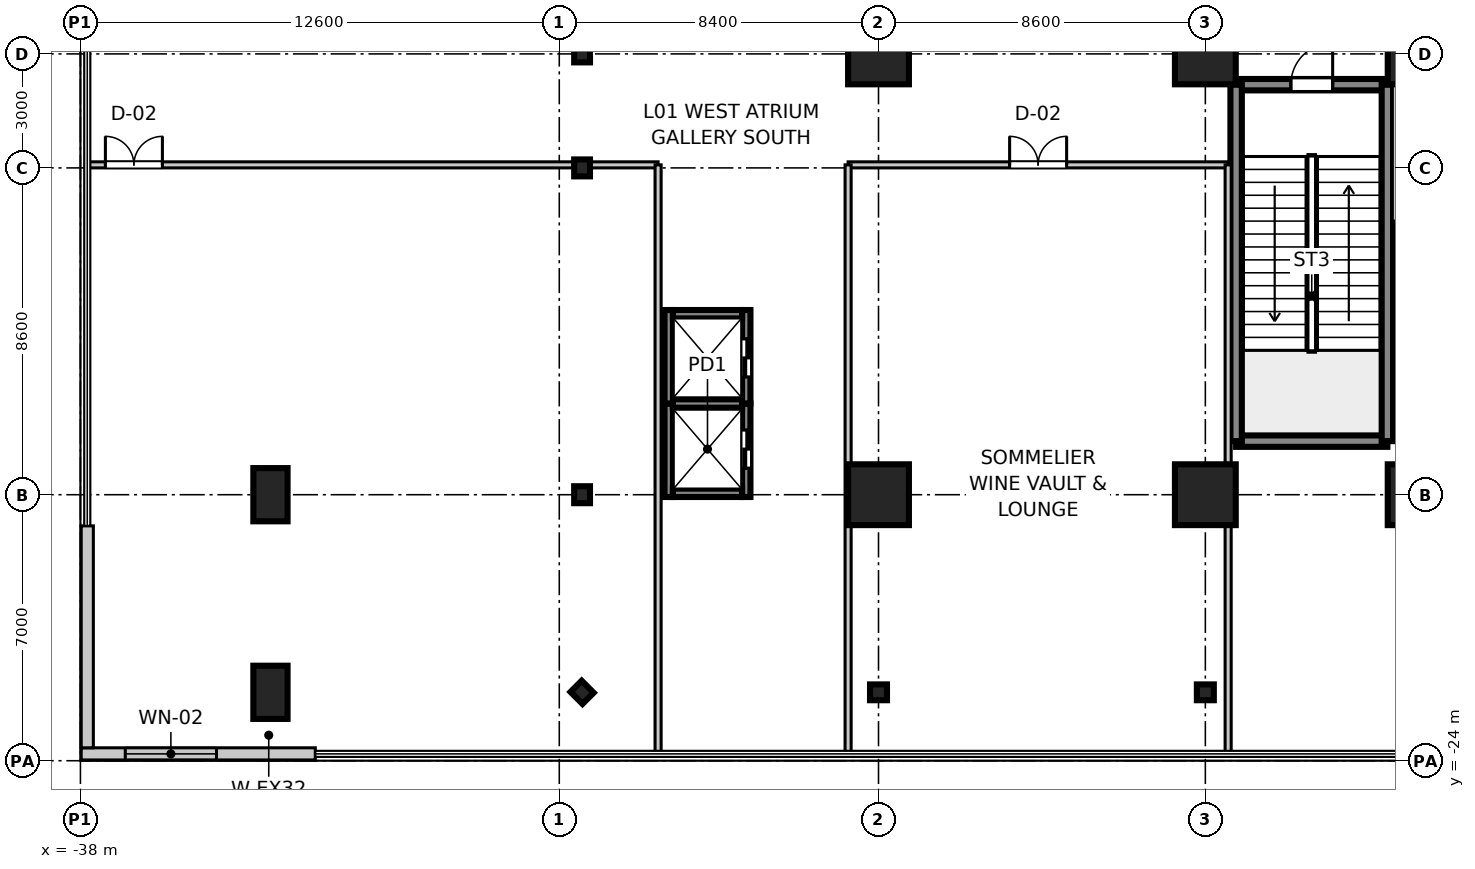
"""IFC4 building model, lengths in metres.
Left out: names, types, materials, properties, quantities, classifications, styles, units other than length and angle.
Written with IfcOpenShell. Run it as: python <this file> out.ifc"""

import sys

from ifc_helpers import new_model, si_unit, direction, frame, frame_2d, origin, origin_2d, place, context, subcontext, project, spatial, rectangle, i_section, extrude, source, transform, mapped, element, fill, save


model = new_model("IFC4")
c1 = context("Model", 3, precision=1e-05, world=origin(), true_north=direction((0.0, 1.0)))
c2 = subcontext(c1, "Body", "Model", "MODEL_VIEW")
j1 = project(units=[si_unit("LENGTHUNIT", "METRE"), si_unit("PLANEANGLEUNIT", "RADIAN")], contexts=[c1])
p1 = place(None, origin())
s1 = spatial("IfcSite", under=j1, at=p1, CompositionType="ELEMENT")
p2 = place(p1, origin())
s2 = spatial("IfcBuilding", under=s1, at=p2, CompositionType="ELEMENT")
p3 = place(p2, frame((0.0, 0.0, 5.4)))
s3 = spatial("IfcBuildingStorey", under=s2, at=p3, CompositionType="ELEMENT", Elevation=5.4)
m1 = source(origin(), c2, "Body", "SweptSolid", [
    extrude(rectangle(XDim=1.6, YDim=1.6, at=origin_2d()), origin(), (0.0, 0.0, 1.0), 5.355),
])
for number, where, z_axis, x_axis in (
    (1, (-17.0, -17.0, 0.0), (0.0, 0.0, 1.0), (1.0, 0.0, 0.0)),
    (2, (-17.0, -5.4, 0.0), (0.0, 0.0, 1.0), (1.0, 0.0, 0.0)),
    (3, (-8.4, -17.0, 0.0), (0.0, 0.0, 1.0), (1.0, 0.0, 0.0)),
    (4, (-8.4, -5.4, 0.0), (0.0, 0.0, 1.0), (1.0, 0.0, 0.0)),
    (5, (-2.8, -17.0, 0.0), (0.0, 0.0, 1.0), (1.0, 0.0, 0.0)),
    (6, (-2.8, -5.4, 0.0), (0.0, 0.0, 1.0), (1.0, 0.0, 0.0)),
):
    element("IfcColumn", number, at=place(p3, frame(where, z_axis=z_axis, x_axis=x_axis)), inside=s3, PredefinedType="COLUMN", context=c2, shape_type="MappedRepresentation", body=[
        mapped(m1, transform((0.0, 0.0, 0.0), scale=1.0)),
    ])
m2 = source(origin(), c2, "Body", "SweptSolid", [
    extrude(rectangle(XDim=0.9, YDim=1.4, at=origin_2d()), origin(), (0.0, 0.0, 1.0), 5.355),
])
for number, where, z_axis, x_axis in (
    (7, (-33.0, -22.2, 0.0), (0.0, 0.0, 1.0), (1.0, 0.0, 0.0)),
    (8, (-33.0, -17.0, 0.0), (0.0, 0.0, 1.0), (1.0, 0.0, 0.0)),
):
    element("IfcColumn", number, at=place(p3, frame(where, z_axis=z_axis, x_axis=x_axis)), inside=s3, PredefinedType="PILASTER", context=c2, shape_type="MappedRepresentation", body=[
        mapped(m2, transform((0.0, 0.0, 0.0), scale=1.0)),
    ])
m3 = source(origin(), c2, "Body", "SweptSolid", [
    extrude(i_section(OverallWidth=0.416, OverallDepth=0.446, WebThickness=0.025, FlangeThickness=0.04, at=origin_2d()), origin(), (0.0, 0.0, 1.0), 5.355),
])
for number, where, z_axis, x_axis in (
    (9, (-24.8, -17.0, 0.0), (0.0, 0.0, 1.0), (1.0, 0.0, 0.0)),
    (10, (-24.8, -8.4, 0.0), (0.0, 0.0, 1.0), (1.0, 0.0, 0.0)),
    (11, (-24.8, -5.4, 0.0), (0.0, 0.0, 1.0), (1.0, 0.0, 0.0)),
    (12, (-17.0, -22.2, 0.0), (0.0, 0.0, 1.0), (0.0, 1.0, 0.0)),
    (13, (-8.4, -22.2, 0.0), (0.0, 0.0, 1.0), (0.0, 1.0, 0.0)),
    (14, (-24.8, -22.2, 0.0), (0.0, 0.0, 1.0), (0.707, 0.707, 0.0)),
):
    element("IfcColumn", number, at=place(p3, frame(where, z_axis=z_axis, x_axis=x_axis)), inside=s3, PredefinedType="COLUMN", context=c2, shape_type="MappedRepresentation", body=[
        mapped(m3, transform((0.0, 0.0, 0.0), scale=1.0)),
    ])
m4 = source(origin(), c2, "Body", "SweptSolid", [
    extrude(rectangle(XDim=3.98, YDim=0.3, at=frame_2d((1.99, 0.0))), origin(), (0.0, 0.0, 1.0), 5.08),
])
p4 = place(p3, frame((-7.59, -15.59, 0.0), z_axis=(0.0, 0.0, 1.0), x_axis=(1.0, 0.0, 0.0)))
e15 = element("IfcWall", 15, at=p4, inside=s3, PredefinedType="SHEAR", context=c2, shape_type="MappedRepresentation", body=[
    mapped(m4, transform((0.0, 0.0, 0.0), scale=1.0)),
])
p5 = place(p3, frame((-7.59, -6.21, 0.0), z_axis=(0.0, 0.0, 1.0), x_axis=(1.0, 0.0, 0.0)))
e16 = element("IfcWall", 16, at=p5, inside=s3, PredefinedType="SHEAR", context=c2, shape_type="MappedRepresentation", body=[
    mapped(m4, transform((0.0, 0.0, 0.0), scale=1.0)),
])
p6 = place(p5, frame((1.44, 0.0, 0.0)))
e17 = element("IfcOpeningElement", 17, at=p6, cuts=e16, PredefinedType="OPENING", context=c2, shape_type="SweptSolid", body=[
    extrude(rectangle(XDim=1.1, YDim=2.15, at=frame_2d((0.55, 1.075))), frame((0.0, 0.16, 0.0), z_axis=(0.0, -1.0, 0.0), x_axis=(1.0, 0.0, 0.0)), (0.0, 0.0, 1.0), 0.32),
])
m5 = source(origin(), c2, "Body", "SweptSolid", [
    extrude(rectangle(XDim=9.38, YDim=0.3, at=frame_2d((4.69, 0.0))), origin(), (0.0, 0.0, 1.0), 5.08),
])
for number, where, z_axis, x_axis in (
    (18, (-7.59, -15.59, 0.0), (0.0, 0.0, 1.0), (0.0, 1.0, 0.0)),
    (19, (-3.61, -15.59, 0.0), (0.0, 0.0, 1.0), (0.0, 1.0, 0.0)),
):
    element("IfcWall", number, at=place(p3, frame(where, z_axis=z_axis, x_axis=x_axis)), inside=s3, PredefinedType="SHEAR", context=c2, shape_type="MappedRepresentation", body=[
        mapped(m5, transform((0.0, 0.0, 0.0), scale=1.0)),
    ])
m6 = source(origin(), c2, "Body", "SweptSolid", [
    extrude(rectangle(XDim=2.46, YDim=0.22, at=frame_2d((1.23, 0.0))), origin(), (0.0, 0.0, 1.0), 5.08),
])
p7 = place(p3, frame((-22.52, -17.06, 0.0), z_axis=(0.0, 0.0, 1.0), x_axis=(0.0, 1.0, 0.0)))
e20 = element("IfcWall", 20, at=p7, inside=s3, PredefinedType="SHEAR", context=c2, shape_type="MappedRepresentation", body=[
    mapped(m6, transform((0.0, 0.0, 0.0), scale=1.0)),
])
p8 = place(p3, frame((-20.48, -17.06, 0.0), z_axis=(0.0, 0.0, 1.0), x_axis=(0.0, 1.0, 0.0)))
e21 = element("IfcWall", 21, at=p8, inside=s3, PredefinedType="SHEAR", context=c2, shape_type="MappedRepresentation", body=[
    mapped(m6, transform((0.0, 0.0, 0.0), scale=1.0)),
])
p9 = place(p8, frame((0.76, 0.0, 0.0)))
e22 = element("IfcOpeningElement", 22, at=p9, cuts=e21, PredefinedType="OPENING", context=c2, shape_type="SweptSolid", body=[
    extrude(rectangle(XDim=1.0, YDim=2.2, at=frame_2d((0.5, 1.1))), frame((0.0, 0.12, 0.0), z_axis=(0.0, -1.0, 0.0), x_axis=(1.0, 0.0, 0.0)), (0.0, 0.0, 1.0), 0.24),
])
m7 = source(origin(), c2, "Body", "SweptSolid", [
    extrude(rectangle(XDim=1.82, YDim=0.22, at=frame_2d((0.91, 0.0))), origin(), (0.0, 0.0, 1.0), 5.08),
])
p10 = place(p3, frame((-22.41, -16.95, 0.0), z_axis=(0.0, 0.0, 1.0), x_axis=(1.0, 0.0, 0.0)))
e23 = element("IfcWall", 23, at=p10, inside=s3, PredefinedType="SHEAR", context=c2, shape_type="MappedRepresentation", body=[
    mapped(m7, transform((0.0, 0.0, 0.0), scale=1.0)),
])
m8 = source(origin(), c2, "Body", "SweptSolid", [
    extrude(rectangle(XDim=1.82, YDim=0.22, at=frame_2d((0.91, 0.0))), origin(), (0.0, 0.0, 1.0), 5.4),
])
p11 = place(p3, frame((-22.41, -14.6, 0.0), z_axis=(0.0, 0.0, 1.0), x_axis=(1.0, 0.0, 0.0)))
e24 = element("IfcWall", 24, at=p11, inside=s3, PredefinedType="SHEAR", context=c2, shape_type="MappedRepresentation", body=[
    mapped(m8, transform((0.0, 0.0, 0.0), scale=1.0)),
])
m9 = source(origin(), c2, "Body", "SweptSolid", [
    extrude(rectangle(XDim=2.46, YDim=0.22, at=frame_2d((1.23, 0.0))), origin(), (0.0, 0.0, 1.0), 5.08),
])
p12 = place(p3, frame((-22.52, -14.6, 0.0), z_axis=(0.0, 0.0, 1.0), x_axis=(0.0, 1.0, 0.0)))
e25 = element("IfcWall", 25, at=p12, inside=s3, PredefinedType="SHEAR", context=c2, shape_type="MappedRepresentation", body=[
    mapped(m9, transform((0.0, 0.0, 0.0), scale=1.0)),
])
p13 = place(p3, frame((-20.48, -14.6, 0.0), z_axis=(0.0, 0.0, 1.0), x_axis=(0.0, 1.0, 0.0)))
e26 = element("IfcWall", 26, at=p13, inside=s3, PredefinedType="SHEAR", context=c2, shape_type="MappedRepresentation", body=[
    mapped(m9, transform((0.0, 0.0, 0.0), scale=1.0)),
])
p14 = place(p13, frame((0.7, 0.0, 0.0)))
e27 = element("IfcOpeningElement", 27, at=p14, cuts=e26, PredefinedType="OPENING", context=c2, shape_type="SweptSolid", body=[
    extrude(rectangle(XDim=1.0, YDim=2.2, at=frame_2d((0.5, 1.1))), frame((0.0, 0.12, 0.0), z_axis=(0.0, -1.0, 0.0), x_axis=(1.0, 0.0, 0.0)), (0.0, 0.0, 1.0), 0.24),
])
p15 = place(p3, frame((-22.41, -12.25, 0.0), z_axis=(0.0, 0.0, 1.0), x_axis=(1.0, 0.0, 0.0)))
e28 = element("IfcWall", 28, at=p15, inside=s3, PredefinedType="SHEAR", context=c2, shape_type="MappedRepresentation", body=[
    mapped(m7, transform((0.0, 0.0, 0.0), scale=1.0)),
])
m10 = source(origin(), c2, "Body", "SweptSolid", [
    extrude(rectangle(XDim=6.16, YDim=0.32, at=frame_2d((3.08, 0.0))), origin(), (0.0, 0.0, 1.0), 5.08),
])
p16 = place(p3, frame((-37.98, -23.82, 0.0), z_axis=(0.0, 0.0, 1.0), x_axis=(1.0, 0.0, 0.0)))
e29 = element("IfcWall", 29, at=p16, inside=s3, PredefinedType="STANDARD", context=c2, shape_type="MappedRepresentation", body=[
    mapped(m10, transform((0.0, 0.0, 0.0), scale=1.0)),
])
p17 = place(p16, frame((1.16, 0.0, 0.9)))
e30 = element("IfcOpeningElement", 30, at=p17, cuts=e29, PredefinedType="OPENING", context=c2, shape_type="SweptSolid", body=[
    extrude(rectangle(XDim=2.4, YDim=2.2, at=frame_2d((1.2, 1.1))), frame((0.0, 0.17, 0.0), z_axis=(0.0, -1.0, 0.0), x_axis=(1.0, 0.0, 0.0)), (0.0, 0.0, 1.0), 0.34),
])
m11 = source(origin(), c2, "Body", "SweptSolid", [
    extrude(rectangle(XDim=5.84, YDim=0.32, at=frame_2d((2.92, 0.0))), origin(), (0.0, 0.0, 1.0), 5.08),
])
p18 = place(p3, frame((-37.82, -23.66, 0.0), z_axis=(0.0, 0.0, 1.0), x_axis=(0.0, 1.0, 0.0)))
e31 = element("IfcWall", 31, at=p18, inside=s3, PredefinedType="STANDARD", context=c2, shape_type="MappedRepresentation", body=[
    mapped(m11, transform((0.0, 0.0, 0.0), scale=1.0)),
])
m12 = source(origin(), c2, "Body", "SweptSolid", [
    extrude(rectangle(XDim=14.96, YDim=0.16, at=frame_2d((7.48, 0.0))), origin(), (0.0, 0.0, 1.0), 3.4),
])
p19 = place(p3, frame((-37.76, -8.32, 0.0), z_axis=(0.0, 0.0, 1.0), x_axis=(1.0, 0.0, 0.0)))
e32 = element("IfcWall", 32, at=p19, inside=s3, PredefinedType="PARTITIONING", context=c2, shape_type="MappedRepresentation", body=[
    mapped(m12, transform((0.0, 0.0, 0.0), scale=1.0)),
])
p20 = place(p19, frame((0.417, 0.0, 0.0)))
e33 = element("IfcOpeningElement", 33, at=p20, cuts=e32, PredefinedType="OPENING", context=c2, shape_type="SweptSolid", body=[
    extrude(rectangle(XDim=1.5, YDim=2.15, at=frame_2d((0.75, 1.075))), frame((0.0, 0.09, 0.0), z_axis=(0.0, -1.0, 0.0), x_axis=(1.0, 0.0, 0.0)), (0.0, 0.0, 1.0), 0.18),
])
m13 = source(origin(), c2, "Body", "SweptSolid", [
    extrude(rectangle(XDim=15.44, YDim=0.16, at=frame_2d((7.72, 0.0))), origin(), (0.0, 0.0, 1.0), 3.4),
])
p21 = place(p3, frame((-22.8, -23.76, 0.0), z_axis=(0.0, 0.0, 1.0), x_axis=(0.0, 1.0, 0.0)))
e34 = element("IfcWall", 34, at=p21, inside=s3, PredefinedType="PARTITIONING", context=c2, shape_type="MappedRepresentation", body=[
    mapped(m13, transform((0.0, 0.0, 0.0), scale=1.0)),
])
m14 = source(origin(), c2, "Body", "SweptSolid", [
    extrude(rectangle(XDim=10.0, YDim=0.16, at=frame_2d((5.0, 0.0))), origin(), (0.0, 0.0, 1.0), 3.4),
])
p22 = place(p3, frame((-17.8, -8.32, 0.0), z_axis=(0.0, 0.0, 1.0), x_axis=(1.0, 0.0, 0.0)))
e35 = element("IfcWall", 35, at=p22, inside=s3, PredefinedType="PARTITIONING", context=c2, shape_type="MappedRepresentation", body=[
    mapped(m14, transform((0.0, 0.0, 0.0), scale=1.0)),
])
p23 = place(p22, frame((4.25, 0.0, 0.0)))
e36 = element("IfcOpeningElement", 36, at=p23, cuts=e35, PredefinedType="OPENING", context=c2, shape_type="SweptSolid", body=[
    extrude(rectangle(XDim=1.5, YDim=2.15, at=frame_2d((0.75, 1.075))), frame((0.0, 0.09, 0.0), z_axis=(0.0, -1.0, 0.0), x_axis=(1.0, 0.0, 0.0)), (0.0, 0.0, 1.0), 0.18),
])
for number, where, z_axis, x_axis in (
    (37, (-17.8, -23.76, 0.0), (0.0, 0.0, 1.0), (0.0, 1.0, 0.0)),
    (38, (-7.8, -23.76, 0.0), (0.0, 0.0, 1.0), (0.0, 1.0, 0.0)),
):
    element("IfcWall", number, at=place(p3, frame(where, z_axis=z_axis, x_axis=x_axis)), inside=s3, PredefinedType="PARTITIONING", context=c2, shape_type="MappedRepresentation", body=[
        mapped(m13, transform((0.0, 0.0, 0.0), scale=1.0)),
    ])
m15 = source(origin(), c2, "Body", "SweptSolid", [
    extrude(rectangle(XDim=5.6, YDim=0.16, at=frame_2d((2.8, 0.0))), origin(), (0.0, 0.0, 1.0), 3.4),
])
p24 = place(p3, frame((-3.4, -9.8, 0.0), z_axis=(0.0, 0.0, 1.0), x_axis=(1.0, 0.0, 0.0)))
e39 = element("IfcWall", 39, at=p24, inside=s3, PredefinedType="PARTITIONING", context=c2, shape_type="MappedRepresentation", body=[
    mapped(m15, transform((0.0, 0.0, 0.0), scale=1.0)),
])
m16 = source(origin(), c2, "Body", "SweptSolid", [
    extrude(rectangle(XDim=5.25, YDim=0.16, at=frame_2d((2.625, 0.0))), origin(), (0.0, 0.0, 1.0), 3.4),
])
p25 = place(p3, frame((-3.4, -9.8, 0.0), z_axis=(0.0, 0.0, 1.0), x_axis=(0.0, 1.0, 0.0)))
e40 = element("IfcWall", 40, at=p25, inside=s3, PredefinedType="PARTITIONING", context=c2, shape_type="MappedRepresentation", body=[
    mapped(m16, transform((0.0, 0.0, 0.0), scale=1.0)),
])
m17 = source(origin(), c2, "Body", "SweptSolid", [
    extrude(rectangle(XDim=1.1, YDim=2.15, at=frame_2d((0.55, 1.075))), frame((0.0, 0.025, 0.0), z_axis=(0.0, -1.0, 0.0), x_axis=(1.0, 0.0, 0.0)), (0.0, 0.0, 1.0), 0.05),
])
p26 = place(p6, frame((1.1, 0.0, 0.0), z_axis=(0.0, 0.0, 1.0), x_axis=(-1.0, 0.0, 0.0)))
e41 = element("IfcDoor", 41, at=p26, inside=s3, OperationType="SINGLE_SWING_RIGHT", PredefinedType="DOOR", context=c2, shape_type="MappedRepresentation", body=[
    mapped(m17, transform((0.0, 0.0, 0.0), scale=1.0)),
])
fill(e17, e41)
m18 = source(origin(), c2, "Body", "SweptSolid", [
    extrude(rectangle(XDim=1.0, YDim=2.2, at=frame_2d((0.5, 1.1))), frame((0.0, 0.025, 0.0), z_axis=(0.0, -1.0, 0.0), x_axis=(1.0, 0.0, 0.0)), (0.0, 0.0, 1.0), 0.05),
])
p27 = place(p9, frame((1.0, 0.0, 0.0), z_axis=(0.0, 0.0, 1.0), x_axis=(-1.0, 0.0, 0.0)))
e42 = element("IfcDoor", 42, at=p27, inside=s3, OperationType="DOUBLE_DOOR_SLIDING", PredefinedType="DOOR", context=c2, shape_type="MappedRepresentation", body=[
    mapped(m18, transform((0.0, 0.0, 0.0), scale=1.0)),
])
fill(e22, e42)
p28 = place(p14, frame((1.0, 0.0, 0.0), z_axis=(0.0, 0.0, 1.0), x_axis=(-1.0, 0.0, 0.0)))
e43 = element("IfcDoor", 43, at=p28, inside=s3, OperationType="DOUBLE_DOOR_SLIDING", PredefinedType="DOOR", context=c2, shape_type="MappedRepresentation", body=[
    mapped(m18, transform((0.0, 0.0, 0.0), scale=1.0)),
])
fill(e27, e43)
m19 = source(origin(), c2, "Body", "SweptSolid", [
    extrude(rectangle(XDim=2.4, YDim=2.2, at=frame_2d((1.2, 1.1))), frame((0.0, 0.03, 0.0), z_axis=(0.0, -1.0, 0.0), x_axis=(1.0, 0.0, 0.0)), (0.0, 0.0, 1.0), 0.06),
])
p29 = place(p17, origin())
e44 = element("IfcWindow", 44, at=p29, inside=s3, PartitioningType="SINGLE_PANEL", PredefinedType="WINDOW", context=c2, shape_type="MappedRepresentation", body=[
    mapped(m19, transform((0.0, 0.0, 0.0), scale=1.0)),
])
fill(e30, e44)
m20 = source(origin(), c2, "Body", "SweptSolid", [
    extrude(rectangle(XDim=1.5, YDim=2.15, at=frame_2d((0.75, 1.075))), frame((0.0, 0.025, 0.0), z_axis=(0.0, -1.0, 0.0), x_axis=(1.0, 0.0, 0.0)), (0.0, 0.0, 1.0), 0.05),
])
p30 = place(p20, frame((1.5, 0.0, 0.0), z_axis=(0.0, 0.0, 1.0), x_axis=(-1.0, 0.0, 0.0)))
e45 = element("IfcDoor", 45, at=p30, inside=s3, OperationType="DOUBLE_DOOR_SINGLE_SWING", PredefinedType="DOOR", context=c2, shape_type="MappedRepresentation", body=[
    mapped(m20, transform((0.0, 0.0, 0.0), scale=1.0)),
])
fill(e33, e45)
p31 = place(p23, frame((1.5, 0.0, 0.0), z_axis=(0.0, 0.0, 1.0), x_axis=(-1.0, 0.0, 0.0)))
e46 = element("IfcDoor", 46, at=p31, inside=s3, OperationType="DOUBLE_DOOR_SINGLE_SWING", PredefinedType="DOOR", context=c2, shape_type="MappedRepresentation", body=[
    mapped(m20, transform((0.0, 0.0, 0.0), scale=1.0)),
])
fill(e36, e46)
save(model, sys.argv[1])
